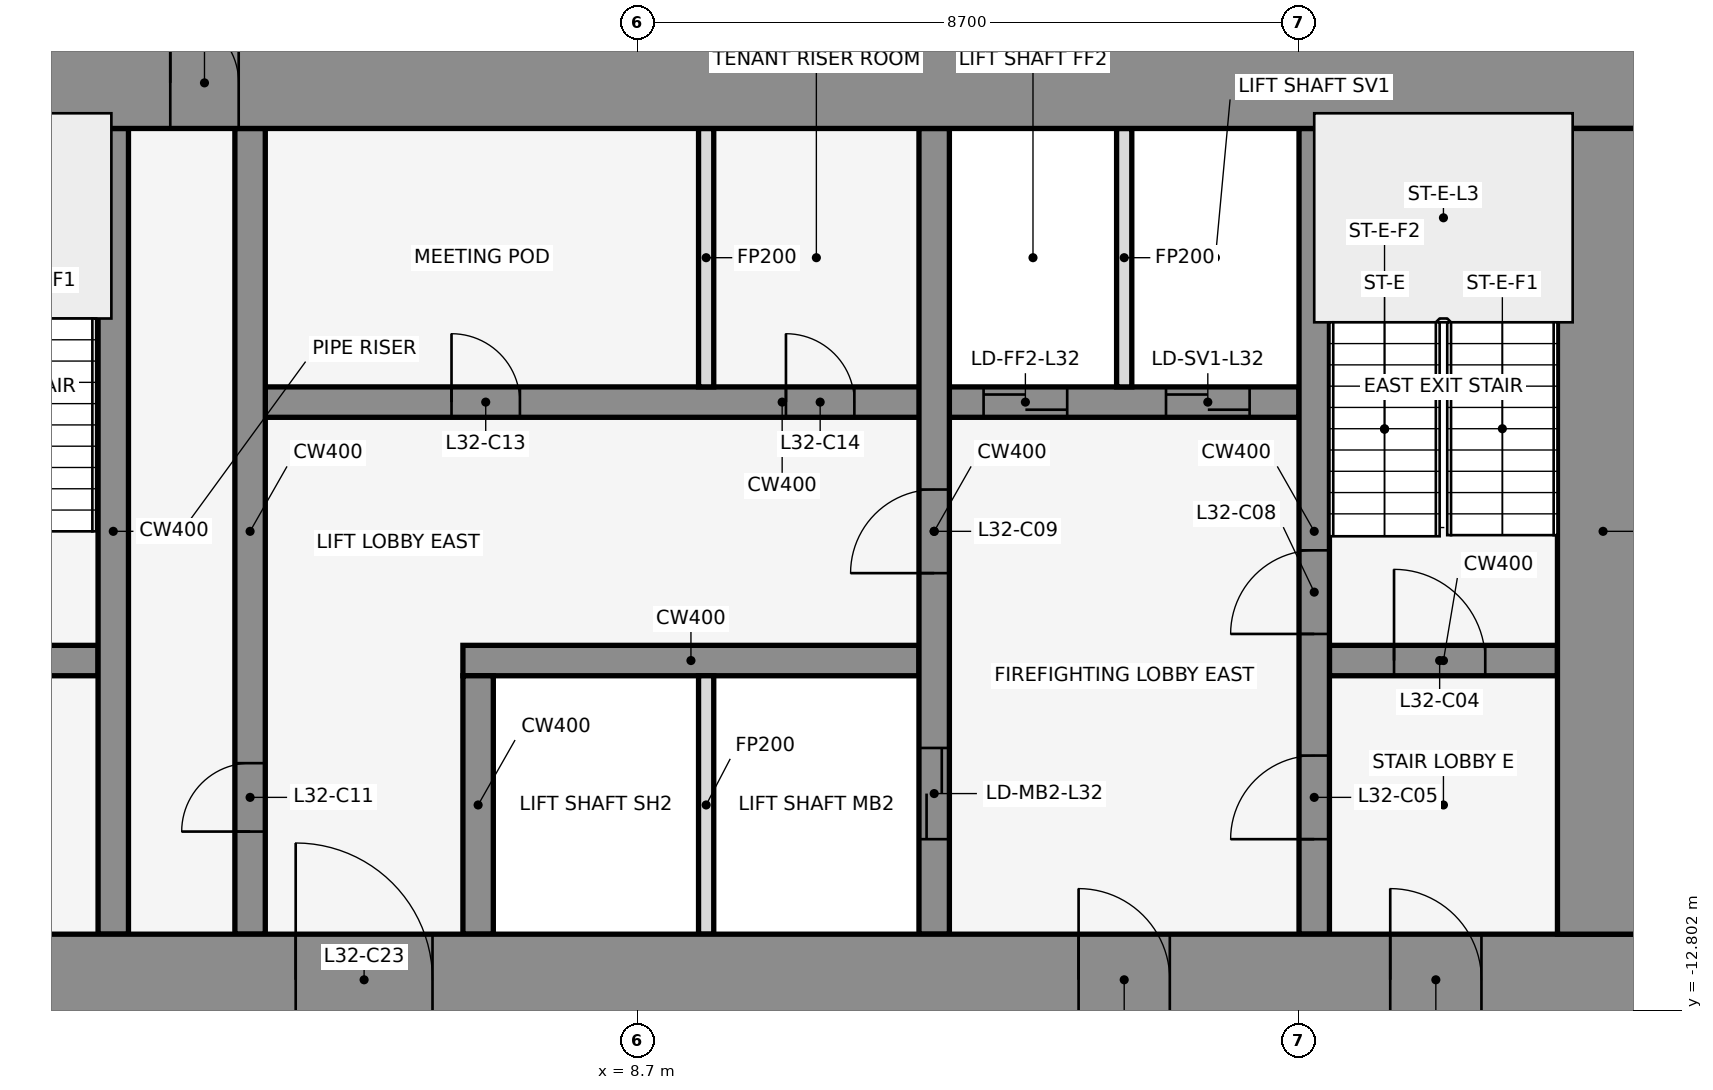
"""IFC4 building model, lengths in metres.
Left out: names, types, materials, properties, quantities, classifications, styles, units other than length and angle.
Written with IfcOpenShell. Run it as: python <this file> out.ifc"""

import sys

from ifc_helpers import new_model, si_unit, direction, frame, frame_2d, origin, place, context, subcontext, project, spatial, rectangle, extrude, element, fill, save


model = new_model("IFC4")
c1 = context("Model", 3, precision=1e-05, world=origin(), true_north=direction((0.0, 1.0)))
c2 = subcontext(c1, "Body", "Model", "MODEL_VIEW")
j1 = project(units=[si_unit("LENGTHUNIT", "METRE"), si_unit("PLANEANGLEUNIT", "RADIAN")], contexts=[c1])
p1 = place(None, origin())
s1 = spatial("IfcSite", under=j1, at=p1, CompositionType="ELEMENT")
p2 = place(p1, origin())
s2 = spatial("IfcBuilding", under=s1, at=p2, CompositionType="ELEMENT")
p3 = place(p2, frame((0.0, 0.0, 148.6)))
s3 = spatial("IfcBuildingStorey", under=s2, at=p3, CompositionType="ELEMENT", Elevation=148.6)
for number, where, z_axis, x_axis in (
    (1, (16.432, -0.105, 0.0), (0.0, 0.0, 1.0), (-0.84, 0.543, 0.0)),
    (2, (1.901, 1.08, 0.0), (0.0, 0.0, 1.0), (-0.84, -0.543, 0.0)),
):
    element("IfcWall", number, at=place(p3, frame(where, z_axis=z_axis, x_axis=x_axis)), inside=s3, PredefinedType="STANDARD", context=c2, shape_type="SweptSolid", body=[
        extrude(rectangle(XDim=2.183, YDim=0.25, at=frame_2d((1.091, 0.0))), origin(), (0.0, 0.0, 1.0), 3.95),
    ])
p4 = place(p3, frame((-1.6, -8.2, 0.0), z_axis=(0.0, 0.0, 1.0), x_axis=(1.0, 0.0, 0.0)))
e3 = element("IfcWall", 3, at=p4, inside=s3, PredefinedType="SHEAR", context=c2, shape_type="SweptSolid", body=[
    extrude(rectangle(XDim=3.2, YDim=0.4, at=frame_2d((1.6, 0.0))), origin(), (0.0, 0.0, 1.0), 4.1),
])
p5 = place(p4, frame((1.05, 0.0, 0.0)))
e4 = element("IfcOpeningElement", 4, at=p5, cuts=e3, PredefinedType="OPENING", context=c2, shape_type="SweptSolid", body=[
    extrude(rectangle(XDim=1.2, YDim=2.1, at=frame_2d((0.6, 1.05))), frame((0.0, 0.212, 0.0), z_axis=(0.0, -1.0, 0.0), x_axis=(1.0, 0.0, 0.0)), (0.0, 0.0, 1.0), 0.424),
])
p6 = place(p3, frame((6.4, -8.2, 0.0), z_axis=(0.0, 0.0, 1.0), x_axis=(1.0, 0.0, 0.0)))
e5 = element("IfcWall", 5, at=p6, inside=s3, PredefinedType="SHEAR", context=c2, shape_type="SweptSolid", body=[
    extrude(rectangle(XDim=6.0, YDim=0.4, at=frame_2d((3.0, 0.0))), origin(), (0.0, 0.0, 1.0), 4.1),
])
p7 = place(p3, frame((17.8, -8.2, 0.0), z_axis=(0.0, 0.0, 1.0), x_axis=(1.0, 0.0, 0.0)))
e6 = element("IfcWall", 6, at=p7, inside=s3, PredefinedType="SHEAR", context=c2, shape_type="SweptSolid", body=[
    extrude(rectangle(XDim=3.0, YDim=0.4, at=frame_2d((1.5, 0.0))), origin(), (0.0, 0.0, 1.0), 4.1),
])
p8 = place(p7, frame((0.85, 0.0, 0.0)))
e7 = element("IfcOpeningElement", 7, at=p8, cuts=e6, PredefinedType="OPENING", context=c2, shape_type="SweptSolid", body=[
    extrude(rectangle(XDim=1.2, YDim=2.1, at=frame_2d((0.6, 1.05))), frame((0.0, 0.212, 0.0), z_axis=(0.0, -1.0, 0.0), x_axis=(1.0, 0.0, 0.0)), (0.0, 0.0, 1.0), 0.424),
])
p9 = place(p3, frame((3.8, -4.8, 0.0), z_axis=(0.0, 0.0, 1.0), x_axis=(1.0, 0.0, 0.0)))
e8 = element("IfcWall", 8, at=p9, inside=s3, PredefinedType="SHEAR", context=c2, shape_type="SweptSolid", body=[
    extrude(rectangle(XDim=13.6, YDim=0.4, at=frame_2d((6.8, 0.0))), origin(), (0.0, 0.0, 1.0), 4.1),
])
p10 = place(p9, frame((9.45, 0.0, 0.0)))
e9 = element("IfcOpeningElement", 9, at=p10, cuts=e8, PredefinedType="OPENING", context=c2, shape_type="SweptSolid", body=[
    extrude(rectangle(XDim=1.1, YDim=2.1, at=frame_2d((0.55, 1.05))), frame((0.0, 0.212, 0.0), z_axis=(0.0, -1.0, 0.0), x_axis=(1.0, 0.0, 0.0)), (0.0, 0.0, 1.0), 0.424),
])
p11 = place(p9, frame((11.85, 0.0, 0.0)))
e10 = element("IfcOpeningElement", 10, at=p11, cuts=e8, PredefinedType="OPENING", context=c2, shape_type="SweptSolid", body=[
    extrude(rectangle(XDim=1.1, YDim=2.1, at=frame_2d((0.55, 1.05))), frame((0.0, 0.212, 0.0), z_axis=(0.0, -1.0, 0.0), x_axis=(1.0, 0.0, 0.0)), (0.0, 0.0, 1.0), 0.424),
])
p12 = place(p9, frame((2.45, 0.0, 0.0)))
e11 = element("IfcOpeningElement", 11, at=p12, cuts=e8, PredefinedType="OPENING", context=c2, shape_type="SweptSolid", body=[
    extrude(rectangle(XDim=0.9, YDim=2.1, at=frame_2d((0.45, 1.05))), frame((0.0, 0.212, 0.0), z_axis=(0.0, -1.0, 0.0), x_axis=(1.0, 0.0, 0.0)), (0.0, 0.0, 1.0), 0.424),
])
p13 = place(p9, frame((6.85, 0.0, 0.0)))
e12 = element("IfcOpeningElement", 12, at=p13, cuts=e8, PredefinedType="OPENING", context=c2, shape_type="SweptSolid", body=[
    extrude(rectangle(XDim=0.9, YDim=2.1, at=frame_2d((0.45, 1.05))), frame((0.0, 0.212, 0.0), z_axis=(0.0, -1.0, 0.0), x_axis=(1.0, 0.0, 0.0)), (0.0, 0.0, 1.0), 0.424),
])
p14 = place(p3, frame((1.8, -11.8, 0.0), z_axis=(0.0, 0.0, 1.0), x_axis=(0.0, 1.0, 0.0)))
e13 = element("IfcWall", 13, at=p14, inside=s3, PredefinedType="SHEAR", context=c2, shape_type="SweptSolid", body=[
    extrude(rectangle(XDim=10.6, YDim=0.4, at=frame_2d((5.3, 0.0))), origin(), (0.0, 0.0, 1.0), 4.1),
])
p15 = place(p3, frame((3.6, -11.8, 0.0), z_axis=(0.0, 0.0, 1.0), x_axis=(0.0, 1.0, 0.0)))
e14 = element("IfcWall", 14, at=p15, inside=s3, PredefinedType="SHEAR", context=c2, shape_type="SweptSolid", body=[
    extrude(rectangle(XDim=10.6, YDim=0.4, at=frame_2d((5.3, 0.0))), origin(), (0.0, 0.0, 1.0), 4.1),
])
p16 = place(p15, frame((1.35, 0.0, 0.0)))
e15 = element("IfcOpeningElement", 15, at=p16, cuts=e14, PredefinedType="OPENING", context=c2, shape_type="SweptSolid", body=[
    extrude(rectangle(XDim=0.9, YDim=2.1, at=frame_2d((0.45, 1.05))), frame((0.0, 0.212, 0.0), z_axis=(0.0, -1.0, 0.0), x_axis=(1.0, 0.0, 0.0)), (0.0, 0.0, 1.0), 0.424),
])
p17 = place(p3, frame((6.6, -11.8, 0.0), z_axis=(0.0, 0.0, 1.0), x_axis=(0.0, 1.0, 0.0)))
e16 = element("IfcWall", 16, at=p17, inside=s3, PredefinedType="SHEAR", context=c2, shape_type="SweptSolid", body=[
    extrude(rectangle(XDim=3.4, YDim=0.4, at=frame_2d((1.7, 0.0))), origin(), (0.0, 0.0, 1.0), 4.1),
])
for number, where, z_axis, x_axis in (
    (17, (9.6, -11.8, 0.0), (0.0, 0.0, 1.0), (0.0, 1.0, 0.0)),
    (18, (9.6, -4.6, 0.0), (0.0, 0.0, 1.0), (0.0, 1.0, 0.0)),
):
    element("IfcWall", number, at=place(p3, frame(where, z_axis=z_axis, x_axis=x_axis)), inside=s3, PredefinedType="PARTITIONING", context=c2, shape_type="SweptSolid", body=[
        extrude(rectangle(XDim=3.4, YDim=0.2, at=frame_2d((1.7, 0.0))), origin(), (0.0, 0.0, 1.0), 2.84),
    ])
p18 = place(p3, frame((12.6, -11.8, 0.0), z_axis=(0.0, 0.0, 1.0), x_axis=(0.0, 1.0, 0.0)))
e19 = element("IfcWall", 19, at=p18, inside=s3, PredefinedType="SHEAR", context=c2, shape_type="SweptSolid", body=[
    extrude(rectangle(XDim=10.6, YDim=0.4, at=frame_2d((5.3, 0.0))), origin(), (0.0, 0.0, 1.0), 4.1),
])
p19 = place(p18, frame((1.25, 0.0, 0.0)))
e20 = element("IfcOpeningElement", 20, at=p19, cuts=e19, PredefinedType="OPENING", context=c2, shape_type="SweptSolid", body=[
    extrude(rectangle(XDim=1.2, YDim=2.1, at=frame_2d((0.6, 1.05))), frame((0.0, 0.212, 0.0), z_axis=(0.0, -1.0, 0.0), x_axis=(1.0, 0.0, 0.0)), (0.0, 0.0, 1.0), 0.424),
])
p20 = place(p18, frame((4.75, 0.0, 0.0)))
e21 = element("IfcOpeningElement", 21, at=p20, cuts=e19, PredefinedType="OPENING", context=c2, shape_type="SweptSolid", body=[
    extrude(rectangle(XDim=1.1, YDim=2.1, at=frame_2d((0.55, 1.05))), frame((0.0, 0.212, 0.0), z_axis=(0.0, -1.0, 0.0), x_axis=(1.0, 0.0, 0.0)), (0.0, 0.0, 1.0), 0.424),
])
p21 = place(p3, frame((15.1, -4.6, 0.0), z_axis=(0.0, 0.0, 1.0), x_axis=(0.0, 1.0, 0.0)))
e22 = element("IfcWall", 22, at=p21, inside=s3, PredefinedType="PARTITIONING", context=c2, shape_type="SweptSolid", body=[
    extrude(rectangle(XDim=3.4, YDim=0.2, at=frame_2d((1.7, 0.0))), origin(), (0.0, 0.0, 1.0), 2.84),
])
p22 = place(p3, frame((17.6, -11.8, 0.0), z_axis=(0.0, 0.0, 1.0), x_axis=(0.0, 1.0, 0.0)))
e23 = element("IfcWall", 23, at=p22, inside=s3, PredefinedType="SHEAR", context=c2, shape_type="SweptSolid", body=[
    extrude(rectangle(XDim=10.6, YDim=0.4, at=frame_2d((5.3, 0.0))), origin(), (0.0, 0.0, 1.0), 4.1),
])
p23 = place(p22, frame((1.25, 0.0, 0.0)))
e24 = element("IfcOpeningElement", 24, at=p23, cuts=e23, PredefinedType="OPENING", context=c2, shape_type="SweptSolid", body=[
    extrude(rectangle(XDim=1.1, YDim=2.1, at=frame_2d((0.55, 1.05))), frame((0.0, 0.212, 0.0), z_axis=(0.0, -1.0, 0.0), x_axis=(1.0, 0.0, 0.0)), (0.0, 0.0, 1.0), 0.424),
])
p24 = place(p22, frame((3.95, 0.0, 0.0)))
e25 = element("IfcOpeningElement", 25, at=p24, cuts=e23, PredefinedType="OPENING", context=c2, shape_type="SweptSolid", body=[
    extrude(rectangle(XDim=1.1, YDim=2.1, at=frame_2d((0.55, 1.05))), frame((0.0, 0.212, 0.0), z_axis=(0.0, -1.0, 0.0), x_axis=(1.0, 0.0, 0.0)), (0.0, 0.0, 1.0), 0.424),
])
p25 = place(p3, frame((-22.0, -0.6, 0.0), z_axis=(0.0, 0.0, 1.0), x_axis=(1.0, 0.0, 0.0)))
e26 = element("IfcWall", 26, at=p25, inside=s3, PredefinedType="SHEAR", context=c2, shape_type="SweptSolid", body=[
    extrude(rectangle(XDim=44.0, YDim=1.2, at=frame_2d((22.0, 0.0))), origin(), (0.0, 0.0, 1.0), 4.1),
])
p26 = place(p25, frame((18.55, 0.0, 0.0)))
e27 = element("IfcOpeningElement", 27, at=p26, cuts=e26, PredefinedType="OPENING", context=c2, shape_type="SweptSolid", body=[
    extrude(rectangle(XDim=0.9, YDim=2.1, at=frame_2d((0.45, 1.05))), frame((0.0, 0.612, 0.0), z_axis=(0.0, -1.0, 0.0), x_axis=(1.0, 0.0, 0.0)), (0.0, 0.0, 1.0), 1.224),
])
p27 = place(p25, frame((24.55, 0.0, 0.0)))
e28 = element("IfcOpeningElement", 28, at=p27, cuts=e26, PredefinedType="OPENING", context=c2, shape_type="SweptSolid", body=[
    extrude(rectangle(XDim=0.9, YDim=2.1, at=frame_2d((0.45, 1.05))), frame((0.0, 0.612, 0.0), z_axis=(0.0, -1.0, 0.0), x_axis=(1.0, 0.0, 0.0)), (0.0, 0.0, 1.0), 1.224),
])
p28 = place(p3, frame((-22.0, -12.4, 0.0), z_axis=(0.0, 0.0, 1.0), x_axis=(1.0, 0.0, 0.0)))
e29 = element("IfcWall", 29, at=p28, inside=s3, PredefinedType="SHEAR", context=c2, shape_type="SweptSolid", body=[
    extrude(rectangle(XDim=44.0, YDim=1.2, at=frame_2d((22.0, 0.0))), origin(), (0.0, 0.0, 1.0), 4.1),
])
p29 = place(p28, frame((2.2, 0.0, 0.0)))
e30 = element("IfcOpeningElement", 30, at=p29, cuts=e29, PredefinedType="OPENING", context=c2, shape_type="SweptSolid", body=[
    extrude(rectangle(XDim=1.2, YDim=2.1, at=frame_2d((0.6, 1.05))), frame((0.0, 0.612, 0.0), z_axis=(0.0, -1.0, 0.0), x_axis=(1.0, 0.0, 0.0)), (0.0, 0.0, 1.0), 1.224),
])
p30 = place(p28, frame((21.4, 0.0, 0.0)))
e31 = element("IfcOpeningElement", 31, at=p30, cuts=e29, PredefinedType="OPENING", context=c2, shape_type="SweptSolid", body=[
    extrude(rectangle(XDim=1.2, YDim=2.1, at=frame_2d((0.6, 1.05))), frame((0.0, 0.612, 0.0), z_axis=(0.0, -1.0, 0.0), x_axis=(1.0, 0.0, 0.0)), (0.0, 0.0, 1.0), 1.224),
])
p31 = place(p28, frame((40.6, 0.0, 0.0)))
e32 = element("IfcOpeningElement", 32, at=p31, cuts=e29, PredefinedType="OPENING", context=c2, shape_type="SweptSolid", body=[
    extrude(rectangle(XDim=1.2, YDim=2.1, at=frame_2d((0.6, 1.05))), frame((0.0, 0.612, 0.0), z_axis=(0.0, -1.0, 0.0), x_axis=(1.0, 0.0, 0.0)), (0.0, 0.0, 1.0), 1.224),
])
p32 = place(p28, frame((16.0, 0.0, 0.0)))
e33 = element("IfcOpeningElement", 33, at=p32, cuts=e29, PredefinedType="OPENING", context=c2, shape_type="SweptSolid", body=[
    extrude(rectangle(XDim=1.8, YDim=2.1, at=frame_2d((0.9, 1.05))), frame((0.0, 0.612, 0.0), z_axis=(0.0, -1.0, 0.0), x_axis=(1.0, 0.0, 0.0)), (0.0, 0.0, 1.0), 1.224),
])
p33 = place(p28, frame((6.3, 0.0, 0.0)))
e34 = element("IfcOpeningElement", 34, at=p33, cuts=e29, PredefinedType="OPENING", context=c2, shape_type="SweptSolid", body=[
    extrude(rectangle(XDim=1.2, YDim=2.1, at=frame_2d((0.6, 1.05))), frame((0.0, 0.612, 0.0), z_axis=(0.0, -1.0, 0.0), x_axis=(1.0, 0.0, 0.0)), (0.0, 0.0, 1.0), 1.224),
])
p34 = place(p28, frame((26.2, 0.0, 0.0)))
e35 = element("IfcOpeningElement", 35, at=p34, cuts=e29, PredefinedType="OPENING", context=c2, shape_type="SweptSolid", body=[
    extrude(rectangle(XDim=1.8, YDim=2.1, at=frame_2d((0.9, 1.05))), frame((0.0, 0.612, 0.0), z_axis=(0.0, -1.0, 0.0), x_axis=(1.0, 0.0, 0.0)), (0.0, 0.0, 1.0), 1.224),
])
p35 = place(p28, frame((36.5, 0.0, 0.0)))
e36 = element("IfcOpeningElement", 36, at=p35, cuts=e29, PredefinedType="OPENING", context=c2, shape_type="SweptSolid", body=[
    extrude(rectangle(XDim=1.2, YDim=2.1, at=frame_2d((0.6, 1.05))), frame((0.0, 0.612, 0.0), z_axis=(0.0, -1.0, 0.0), x_axis=(1.0, 0.0, 0.0)), (0.0, 0.0, 1.0), 1.224),
])
p36 = place(p3, frame((21.4, -11.8, 0.0), z_axis=(0.0, 0.0, 1.0), x_axis=(0.0, 1.0, 0.0)))
e37 = element("IfcWall", 37, at=p36, inside=s3, PredefinedType="SHEAR", context=c2, shape_type="SweptSolid", body=[
    extrude(rectangle(XDim=10.6, YDim=1.2, at=frame_2d((5.3, 0.0))), origin(), (0.0, 0.0, 1.0), 4.1),
])
p37 = place(p8, origin())
e38 = element("IfcDoor", 38, at=p37, inside=s3, OperationType="SINGLE_SWING_RIGHT", PredefinedType="DOOR", context=c2, shape_type="SweptSolid", body=[
    extrude(rectangle(XDim=1.2, YDim=2.1, at=frame_2d((0.6, 1.05))), frame((0.0, 0.025, 0.0), z_axis=(0.0, -1.0, 0.0), x_axis=(1.0, 0.0, 0.0)), (0.0, 0.0, 1.0), 0.05),
])
fill(e7, e38)
p38 = place(p23, origin())
e39 = element("IfcDoor", 39, at=p38, inside=s3, OperationType="SINGLE_SWING_LEFT", PredefinedType="DOOR", context=c2, shape_type="SweptSolid", body=[
    extrude(rectangle(XDim=1.1, YDim=2.1, at=frame_2d((0.55, 1.05))), frame((0.0, 0.025, 0.0), z_axis=(0.0, -1.0, 0.0), x_axis=(1.0, 0.0, 0.0)), (0.0, 0.0, 1.0), 0.05),
])
fill(e24, e39)
p39 = place(p19, origin())
e40 = element("IfcDoor", 40, at=p39, inside=s3, OperationType="DOUBLE_DOOR_SLIDING", PredefinedType="DOOR", context=c2, shape_type="SweptSolid", body=[
    extrude(rectangle(XDim=1.2, YDim=2.1, at=frame_2d((0.6, 1.05))), frame((0.0, 0.025, 0.0), z_axis=(0.0, -1.0, 0.0), x_axis=(1.0, 0.0, 0.0)), (0.0, 0.0, 1.0), 0.05),
])
fill(e20, e40)
p40 = place(p10, origin())
e41 = element("IfcDoor", 41, at=p40, inside=s3, OperationType="DOUBLE_DOOR_SLIDING", PredefinedType="DOOR", context=c2, shape_type="SweptSolid", body=[
    extrude(rectangle(XDim=1.1, YDim=2.1, at=frame_2d((0.55, 1.05))), frame((0.0, 0.025, 0.0), z_axis=(0.0, -1.0, 0.0), x_axis=(1.0, 0.0, 0.0)), (0.0, 0.0, 1.0), 0.05),
])
fill(e9, e41)
p41 = place(p11, origin())
e42 = element("IfcDoor", 42, at=p41, inside=s3, OperationType="DOUBLE_DOOR_SLIDING", PredefinedType="DOOR", context=c2, shape_type="SweptSolid", body=[
    extrude(rectangle(XDim=1.1, YDim=2.1, at=frame_2d((0.55, 1.05))), frame((0.0, 0.025, 0.0), z_axis=(0.0, -1.0, 0.0), x_axis=(1.0, 0.0, 0.0)), (0.0, 0.0, 1.0), 0.05),
])
fill(e10, e42)
p42 = place(p24, origin())
e43 = element("IfcDoor", 43, at=p42, inside=s3, OperationType="SINGLE_SWING_RIGHT", PredefinedType="DOOR", context=c2, shape_type="SweptSolid", body=[
    extrude(rectangle(XDim=1.1, YDim=2.1, at=frame_2d((0.55, 1.05))), frame((0.0, 0.025, 0.0), z_axis=(0.0, -1.0, 0.0), x_axis=(1.0, 0.0, 0.0)), (0.0, 0.0, 1.0), 0.05),
])
fill(e25, e43)
p43 = place(p20, frame((1.1, 0.0, 0.0), z_axis=(0.0, 0.0, 1.0), x_axis=(-1.0, 0.0, 0.0)))
e44 = element("IfcDoor", 44, at=p43, inside=s3, OperationType="SINGLE_SWING_RIGHT", PredefinedType="DOOR", context=c2, shape_type="SweptSolid", body=[
    extrude(rectangle(XDim=1.1, YDim=2.1, at=frame_2d((0.55, 1.05))), frame((0.0, 0.025, 0.0), z_axis=(0.0, -1.0, 0.0), x_axis=(1.0, 0.0, 0.0)), (0.0, 0.0, 1.0), 0.05),
])
fill(e21, e44)
p44 = place(p16, origin())
e45 = element("IfcDoor", 45, at=p44, inside=s3, OperationType="SINGLE_SWING_LEFT", PredefinedType="DOOR", context=c2, shape_type="SweptSolid", body=[
    extrude(rectangle(XDim=0.9, YDim=2.1, at=frame_2d((0.45, 1.05))), frame((0.0, 0.025, 0.0), z_axis=(0.0, -1.0, 0.0), x_axis=(1.0, 0.0, 0.0)), (0.0, 0.0, 1.0), 0.05),
])
fill(e15, e45)
p45 = place(p12, origin())
e46 = element("IfcDoor", 46, at=p45, inside=s3, OperationType="SINGLE_SWING_LEFT", PredefinedType="DOOR", context=c2, shape_type="SweptSolid", body=[
    extrude(rectangle(XDim=0.9, YDim=2.1, at=frame_2d((0.45, 1.05))), frame((0.0, 0.025, 0.0), z_axis=(0.0, -1.0, 0.0), x_axis=(1.0, 0.0, 0.0)), (0.0, 0.0, 1.0), 0.05),
])
fill(e11, e46)
p46 = place(p13, origin())
e47 = element("IfcDoor", 47, at=p46, inside=s3, OperationType="SINGLE_SWING_RIGHT", PredefinedType="DOOR", context=c2, shape_type="SweptSolid", body=[
    extrude(rectangle(XDim=0.9, YDim=2.1, at=frame_2d((0.45, 1.05))), frame((0.0, 0.025, 0.0), z_axis=(0.0, -1.0, 0.0), x_axis=(1.0, 0.0, 0.0)), (0.0, 0.0, 1.0), 0.05),
])
fill(e12, e47)
p47 = place(p27, origin())
e48 = element("IfcDoor", 48, at=p47, inside=s3, OperationType="SINGLE_SWING_LEFT", PredefinedType="DOOR", context=c2, shape_type="SweptSolid", body=[
    extrude(rectangle(XDim=0.9, YDim=2.1, at=frame_2d((0.45, 1.05))), frame((0.0, 0.025, 0.0), z_axis=(0.0, -1.0, 0.0), x_axis=(1.0, 0.0, 0.0)), (0.0, 0.0, 1.0), 0.05),
])
fill(e28, e48)
p48 = place(p31, frame((1.2, 0.0, 0.0), z_axis=(0.0, 0.0, 1.0), x_axis=(-1.0, 0.0, 0.0)))
e49 = element("IfcDoor", 49, at=p48, inside=s3, OperationType="SINGLE_SWING_RIGHT", PredefinedType="DOOR", context=c2, shape_type="SweptSolid", body=[
    extrude(rectangle(XDim=1.2, YDim=2.1, at=frame_2d((0.6, 1.05))), frame((0.0, 0.025, 0.0), z_axis=(0.0, -1.0, 0.0), x_axis=(1.0, 0.0, 0.0)), (0.0, 0.0, 1.0), 0.05),
])
fill(e32, e49)
p49 = place(p34, origin())
e50 = element("IfcDoor", 50, at=p49, inside=s3, OperationType="SINGLE_SWING_LEFT", PredefinedType="DOOR", context=c2, shape_type="SweptSolid", body=[
    extrude(rectangle(XDim=1.8, YDim=2.1, at=frame_2d((0.9, 1.05))), frame((0.0, 0.025, 0.0), z_axis=(0.0, -1.0, 0.0), x_axis=(1.0, 0.0, 0.0)), (0.0, 0.0, 1.0), 0.05),
])
fill(e35, e50)
p50 = place(p35, frame((1.2, 0.0, 0.0), z_axis=(0.0, 0.0, 1.0), x_axis=(-1.0, 0.0, 0.0)))
e51 = element("IfcDoor", 51, at=p50, inside=s3, OperationType="SINGLE_SWING_RIGHT", PredefinedType="DOOR", context=c2, shape_type="SweptSolid", body=[
    extrude(rectangle(XDim=1.2, YDim=2.1, at=frame_2d((0.6, 1.05))), frame((0.0, 0.025, 0.0), z_axis=(0.0, -1.0, 0.0), x_axis=(1.0, 0.0, 0.0)), (0.0, 0.0, 1.0), 0.05),
])
fill(e36, e51)
save(model, sys.argv[1])
